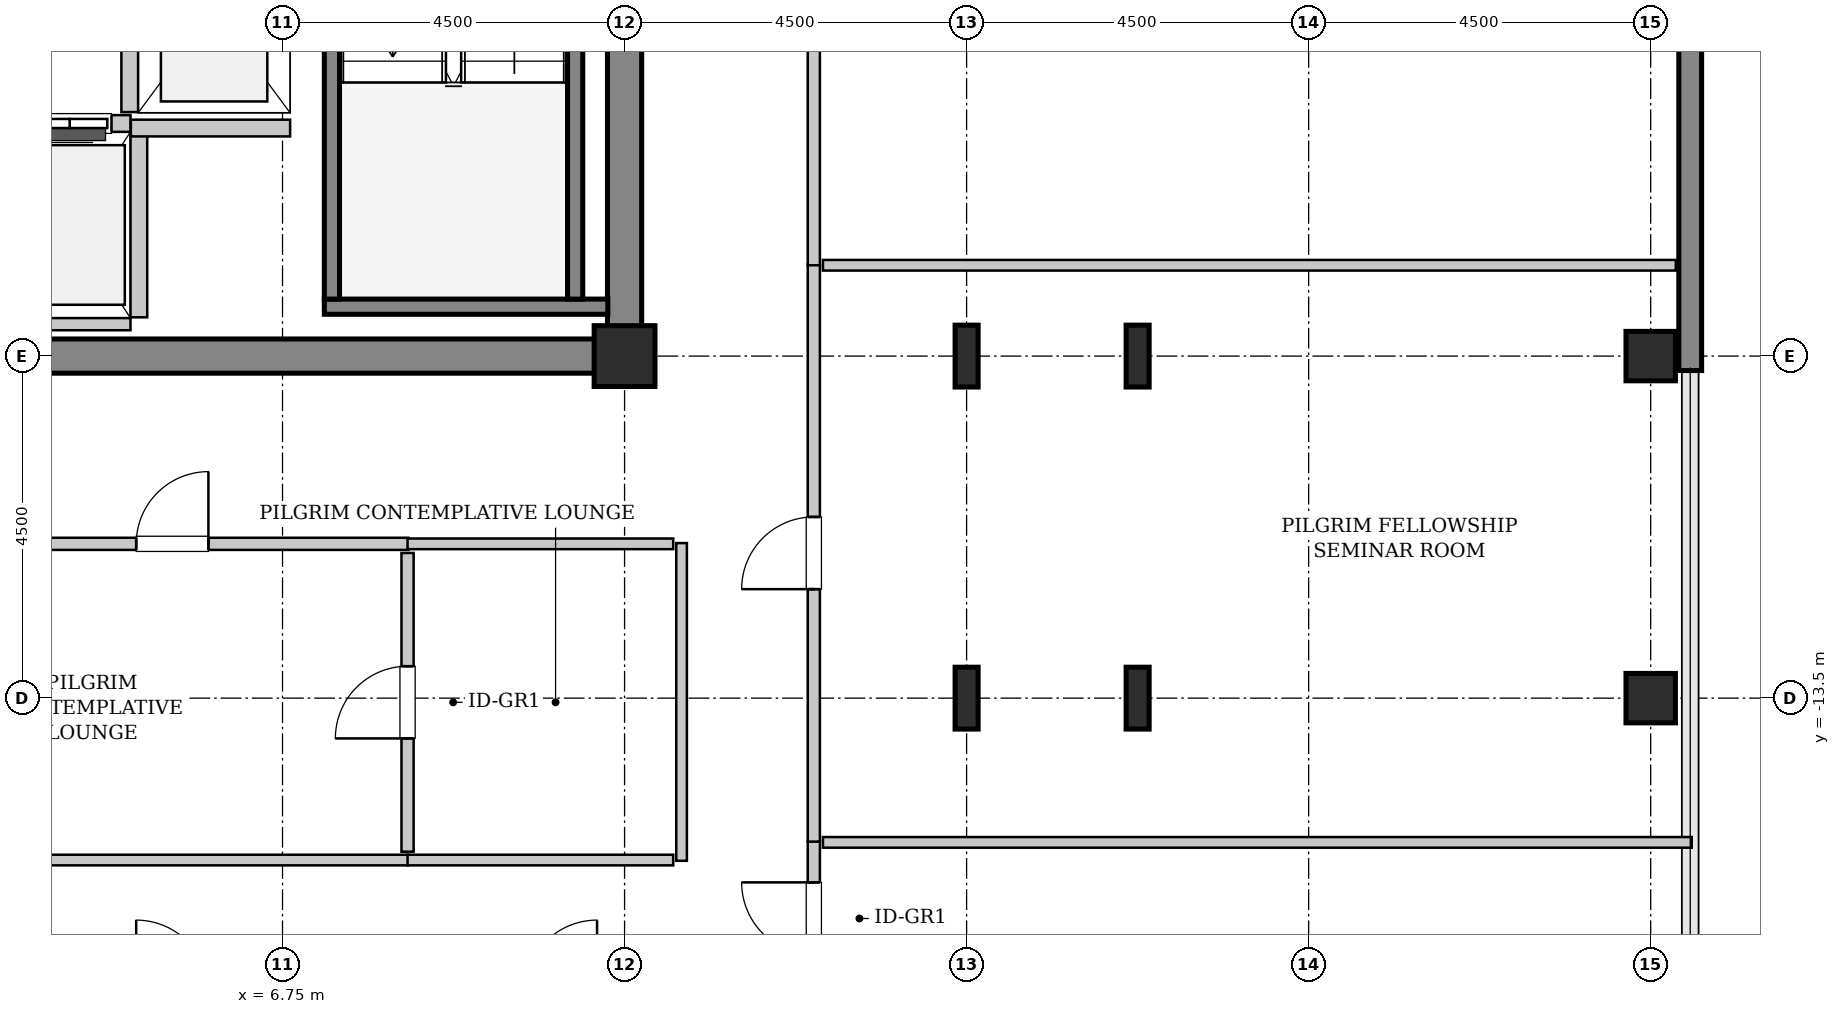
"""IFC4 building model, lengths in metres.
Left out: names, types, materials, properties, quantities, classifications, styles, units other than length and angle.
Written with IfcOpenShell. Run it as: python <this file> out.ifc"""

import sys

from ifc_helpers import new_model, si_unit, direction, frame, frame_2d, origin, origin_2d, place, context, subcontext, project, spatial, rectangle, hollow_rectangle, i_section, extrude, source, transform, mapped, element, fill, save


model = new_model("IFC4")
c1 = context("Model", 3, precision=1e-05, world=origin(), true_north=direction((0.0, 1.0)))
c2 = subcontext(c1, "Body", "Model", "MODEL_VIEW")
j1 = project(units=[si_unit("LENGTHUNIT", "METRE"), si_unit("PLANEANGLEUNIT", "RADIAN")], contexts=[c1])
p1 = place(None, origin())
s1 = spatial("IfcSite", under=j1, at=p1, CompositionType="ELEMENT")
p2 = place(p1, origin())
s2 = spatial("IfcBuilding", under=s1, at=p2, CompositionType="ELEMENT")
p3 = place(p2, frame((0.0, 0.0, 229.4)))
s3 = spatial("IfcBuildingStorey", under=s2, at=p3, CompositionType="ELEMENT", Elevation=229.4)
m1 = source(origin(), c2, "Body", "SweptSolid", [
    extrude(rectangle(XDim=9.925, YDim=0.45, at=frame_2d((4.962, 0.0))), origin(), (0.0, 0.0, 1.0), 3.8),
])
p4 = place(p3, frame((1.55, -9.0, 0.0), z_axis=(0.0, 0.0, 1.0), x_axis=(1.0, 0.0, 0.0)))
e1 = element("IfcWall", 1, at=p4, inside=s3, PredefinedType="SHEAR", context=c2, shape_type="MappedRepresentation", body=[
    mapped(m1, transform((0.0, 0.0, 0.0), x_axis=(1.0, 0.0, 0.0), y_axis=(0.0, 1.0, 0.0), z_axis=(0.0, 0.0, 1.0), scale=1.0)),
])
m2 = source(origin(), c2, "Body", "SweptSolid", [
    extrude(rectangle(XDim=7.425, YDim=0.45, at=frame_2d((3.712, 0.0))), origin(), (0.0, 0.0, 1.0), 3.8),
])
p5 = place(p3, frame((11.25, -8.775, 0.0), z_axis=(0.0, 0.0, 1.0), x_axis=(0.0, 1.0, 0.0)))
e2 = element("IfcWall", 2, at=p5, inside=s3, PredefinedType="SHEAR", context=c2, shape_type="MappedRepresentation", body=[
    mapped(m2, transform((0.0, 0.0, 0.0), x_axis=(1.0, 0.0, 0.0), y_axis=(0.0, 1.0, 0.0), z_axis=(0.0, 0.0, 1.0), scale=1.0)),
])
m3 = source(origin(), c2, "Body", "SweptSolid", [
    extrude(hollow_rectangle(XDim=0.8, YDim=0.8, WallThickness=0.04, InnerFilletRadius=0.04, OuterFilletRadius=0.08, at=origin_2d()), origin(), (0.0, 0.0, 1.0), 3.8),
])
p6 = place(p3, frame((11.25, -9.0, 0.0), z_axis=(0.0, 0.0, 1.0), x_axis=(1.0, 0.0, 0.0)))
e3 = element("IfcColumn", 3, at=p6, inside=s3, PredefinedType="COLUMN", context=c2, shape_type="MappedRepresentation", body=[
    mapped(m3, transform((0.0, 0.0, 0.0), x_axis=(1.0, 0.0, 0.0), y_axis=(0.0, 1.0, 0.0), z_axis=(0.0, 0.0, 1.0), scale=1.0)),
])
m4 = source(origin(), c2, "Body", "SweptSolid", [
    extrude(i_section(OverallWidth=0.303, OverallDepth=0.814, WebThickness=0.021, FlangeThickness=0.04, FilletRadius=0.03, at=origin_2d()), origin(), (0.0, 0.0, 1.0), 3.8),
])
for number, where, z_axis, x_axis in (
    (4, (15.75, -13.5, 0.0), (0.0, 0.0, 1.0), (1.0, 0.0, 0.0)),
    (5, (15.75, -9.0, 0.0), (0.0, 0.0, 1.0), (1.0, 0.0, 0.0)),
    (6, (18.0, -13.5, 0.0), (0.0, 0.0, 1.0), (1.0, 0.0, 0.0)),
    (7, (18.0, -9.0, 0.0), (0.0, 0.0, 1.0), (1.0, 0.0, 0.0)),
):
    element("IfcColumn", number, at=place(p3, frame(where, z_axis=z_axis, x_axis=x_axis)), inside=s3, PredefinedType="COLUMN", context=c2, shape_type="MappedRepresentation", body=[
        mapped(m4, transform((0.0, 0.0, 0.0), x_axis=(1.0, 0.0, 0.0), y_axis=(0.0, 1.0, 0.0), z_axis=(0.0, 0.0, 1.0), scale=1.0)),
    ])
m5 = source(origin(), c2, "Body", "SweptSolid", [
    extrude(hollow_rectangle(XDim=0.65, YDim=0.65, WallThickness=0.032, InnerFilletRadius=0.032, OuterFilletRadius=0.064, at=origin_2d()), origin(), (0.0, 0.0, 1.0), 3.8),
])
for number, where, z_axis, x_axis in (
    (8, (24.75, -13.5, 0.0), (0.0, 0.0, 1.0), (1.0, 0.0, 0.0)),
    (9, (24.75, -9.0, 0.0), (0.0, 0.0, 1.0), (1.0, 0.0, 0.0)),
):
    element("IfcColumn", number, at=place(p3, frame(where, z_axis=z_axis, x_axis=x_axis)), inside=s3, PredefinedType="COLUMN", context=c2, shape_type="MappedRepresentation", body=[
        mapped(m5, transform((0.0, 0.0, 0.0), x_axis=(1.0, 0.0, 0.0), y_axis=(0.0, 1.0, 0.0), z_axis=(0.0, 0.0, 1.0), scale=1.0)),
    ])
m6 = source(origin(), c2, "Body", "SweptSolid", [
    extrude(rectangle(XDim=4.88, YDim=0.3, at=frame_2d((2.44, 0.0))), origin(), (0.0, 0.0, 1.0), 3.55),
])
p7 = place(p3, frame((25.27, -9.19, 0.0), z_axis=(0.0, 0.0, 1.0), x_axis=(0.0, 1.0, 0.0)))
e10 = element("IfcWall", 10, at=p7, inside=s3, PredefinedType="SHEAR", context=c2, shape_type="MappedRepresentation", body=[
    mapped(m6, transform((0.0, 0.0, 0.0), x_axis=(1.0, 0.0, 0.0), y_axis=(0.0, 1.0, 0.0), z_axis=(0.0, 0.0, 1.0), scale=1.0)),
])
m7 = source(origin(), c2, "Body", "SweptSolid", [
    extrude(rectangle(XDim=3.73, YDim=0.2, at=frame_2d((1.865, 0.0))), origin(), (0.0, 0.0, 1.0), 3.8),
])
p8 = place(p3, frame((7.3, -8.35, 0.0), z_axis=(0.0, 0.0, 1.0), x_axis=(1.0, 0.0, 0.0)))
e11 = element("IfcWall", 11, at=p8, inside=s3, PredefinedType="SOLIDWALL", context=c2, shape_type="MappedRepresentation", body=[
    mapped(m7, transform((0.0, 0.0, 0.0), x_axis=(1.0, 0.0, 0.0), y_axis=(0.0, 1.0, 0.0), z_axis=(0.0, 0.0, 1.0), scale=1.0)),
])
m8 = source(origin(), c2, "Body", "SweptSolid", [
    extrude(rectangle(XDim=7.1, YDim=0.2, at=frame_2d((3.55, 0.0))), origin(), (0.0, 0.0, 1.0), 3.8),
])
p9 = place(p3, frame((7.4, -1.15, 0.0), z_axis=(0.0, 0.0, 1.0), x_axis=(0.0, -1.0, 0.0)))
e12 = element("IfcWall", 12, at=p9, inside=s3, PredefinedType="SOLIDWALL", context=c2, shape_type="MappedRepresentation", body=[
    mapped(m8, transform((0.0, 0.0, 0.0), x_axis=(1.0, 0.0, 0.0), y_axis=(0.0, 1.0, 0.0), z_axis=(0.0, 0.0, 1.0), scale=1.0)),
])
p10 = place(p9, frame((0.18, 0.0, 0.0)))
e13 = element("IfcOpeningElement", 13, at=p10, cuts=e12, PredefinedType="OPENING", context=c2, shape_type="SweptSolid", body=[
    extrude(rectangle(XDim=1.1, YDim=2.15, at=frame_2d((0.55, 1.075))), frame((0.0, 0.11, 0.0), z_axis=(0.0, -1.0, 0.0), x_axis=(1.0, 0.0, 0.0)), (0.0, 0.0, 1.0), 0.22),
])
p11 = place(p3, frame((10.6, -1.15, 0.0), z_axis=(0.0, 0.0, 1.0), x_axis=(0.0, -1.0, 0.0)))
e14 = element("IfcWall", 14, at=p11, inside=s3, PredefinedType="SOLIDWALL", context=c2, shape_type="MappedRepresentation", body=[
    mapped(m8, transform((0.0, 0.0, 0.0), x_axis=(1.0, 0.0, 0.0), y_axis=(0.0, 1.0, 0.0), z_axis=(0.0, 0.0, 1.0), scale=1.0)),
])
m9 = source(origin(), c2, "Body", "SweptSolid", [
    extrude(rectangle(XDim=2.68, YDim=0.22, at=frame_2d((1.34, 0.0))), origin(), (0.0, 0.0, 1.0), 3.535),
])
p12 = place(p3, frame((4.74, -3.11, 0.0), z_axis=(0.0, 0.0, 1.0), x_axis=(0.0, -1.0, 0.0)))
e15 = element("IfcWall", 15, at=p12, inside=s3, PredefinedType="SOLIDWALL", context=c2, shape_type="MappedRepresentation", body=[
    mapped(m9, transform((0.0, 0.0, 0.0), x_axis=(1.0, 0.0, 0.0), y_axis=(0.0, 1.0, 0.0), z_axis=(0.0, 0.0, 1.0), scale=1.0)),
])
m10 = source(origin(), c2, "Body", "SweptSolid", [
    extrude(rectangle(XDim=3.2, YDim=0.22, at=frame_2d((1.6, 0.0))), origin(), (0.0, 0.0, 1.0), 3.535),
])
p13 = place(p3, frame((4.75, -5.94, 0.0), z_axis=(0.0, 0.0, 1.0), x_axis=(-1.0, 0.0, 0.0)))
e16 = element("IfcWall", 16, at=p13, inside=s3, PredefinedType="SOLIDWALL", context=c2, shape_type="MappedRepresentation", body=[
    mapped(m10, transform((0.0, 0.0, 0.0), x_axis=(1.0, 0.0, 0.0), y_axis=(0.0, 1.0, 0.0), z_axis=(0.0, 0.0, 1.0), scale=1.0)),
])
p14 = place(p13, frame((1.875, 0.0, 0.0)))
e17 = element("IfcOpeningElement", 17, at=p14, cuts=e16, PredefinedType="OPENING", context=c2, shape_type="SweptSolid", body=[
    extrude(rectangle(XDim=1.1, YDim=2.2, at=frame_2d((0.55, 1.1))), frame((0.0, 0.12, 0.0), z_axis=(0.0, -1.0, 0.0), x_axis=(1.0, 0.0, 0.0)), (0.0, 0.0, 1.0), 0.24),
])
p15 = place(p13, frame((0.25, 0.0, 0.0)))
e18 = element("IfcOpeningElement", 18, at=p15, cuts=e16, PredefinedType="OPENING", context=c2, shape_type="SweptSolid", body=[
    extrude(rectangle(XDim=1.1, YDim=2.2, at=frame_2d((0.55, 1.1))), frame((0.0, 0.12, 0.0), z_axis=(0.0, -1.0, 0.0), x_axis=(1.0, 0.0, 0.0)), (0.0, 0.0, 1.0), 0.24),
])
m11 = source(origin(), c2, "Body", "SweptSolid", [
    extrude(rectangle(XDim=3.2, YDim=0.16, at=frame_2d((1.6, 0.0))), origin(), (0.0, 0.0, 1.0), 2.625),
])
p16 = place(p3, frame((1.55, -8.58, 0.0), z_axis=(0.0, 0.0, 1.0), x_axis=(1.0, 0.0, 0.0)))
e19 = element("IfcWall", 19, at=p16, inside=s3, PredefinedType="PARTITIONING", context=c2, shape_type="MappedRepresentation", body=[
    mapped(m11, transform((0.0, 0.0, 0.0), x_axis=(1.0, 0.0, 0.0), y_axis=(0.0, 1.0, 0.0), z_axis=(0.0, 0.0, 1.0), scale=1.0)),
])
m12 = source(origin(), c2, "Body", "SweptSolid", [
    extrude(rectangle(XDim=2.43, YDim=0.22, at=frame_2d((1.215, 0.0))), origin(), (0.0, 0.0, 1.0), 3.535),
])
p17 = place(p3, frame((4.86, -8.49, 0.0), z_axis=(0.0, 0.0, 1.0), x_axis=(0.0, 1.0, 0.0)))
e20 = element("IfcWall", 20, at=p17, inside=s3, PredefinedType="SOLIDWALL", context=c2, shape_type="MappedRepresentation", body=[
    mapped(m12, transform((0.0, 0.0, 0.0), x_axis=(1.0, 0.0, 0.0), y_axis=(0.0, 1.0, 0.0), z_axis=(0.0, 0.0, 1.0), scale=1.0)),
])
m13 = source(origin(), c2, "Body", "SweptSolid", [
    extrude(rectangle(XDim=2.095, YDim=0.22, at=frame_2d((1.048, 0.0))), origin(), (0.0, 0.0, 1.0), 3.535),
])
p18 = place(p3, frame((4.755, -6.0, 0.0), z_axis=(0.0, 0.0, 1.0), x_axis=(1.0, 0.0, 0.0)))
e21 = element("IfcWall", 21, at=p18, inside=s3, PredefinedType="SOLIDWALL", context=c2, shape_type="MappedRepresentation", body=[
    mapped(m13, transform((0.0, 0.0, 0.0), x_axis=(1.0, 0.0, 0.0), y_axis=(0.0, 1.0, 0.0), z_axis=(0.0, 0.0, 1.0), scale=1.0)),
])
m14 = source(origin(), c2, "Body", "SweptSolid", [
    extrude(rectangle(XDim=7.653, YDim=0.16, at=frame_2d((3.826, 0.0))), origin(), (0.0, 0.0, 1.0), 3.535),
])
p19 = place(p3, frame((13.74, -23.04, 0.0), z_axis=(0.0, 0.0, 1.0), x_axis=(0.0, 1.0, 0.0)))
e22 = element("IfcWall", 22, at=p19, inside=s3, PredefinedType="PARTITIONING", context=c2, shape_type="MappedRepresentation", body=[
    mapped(m14, transform((0.0, 0.0, 0.0), x_axis=(1.0, 0.0, 0.0), y_axis=(0.0, 1.0, 0.0), z_axis=(0.0, 0.0, 1.0), scale=1.0)),
])
p20 = place(p19, frame((6.166, 0.0, 0.0)))
e23 = element("IfcOpeningElement", 23, at=p20, cuts=e22, PredefinedType="OPENING", context=c2, shape_type="SweptSolid", body=[
    extrude(rectangle(XDim=0.95, YDim=2.1, at=frame_2d((0.475, 1.05))), frame((0.0, 0.09, 0.0), z_axis=(0.0, -1.0, 0.0), x_axis=(1.0, 0.0, 0.0)), (0.0, 0.0, 1.0), 0.18),
])
m15 = source(origin(), c2, "Body", "SweptSolid", [
    extrude(rectangle(XDim=11.43, YDim=0.14, at=frame_2d((5.715, 0.0))), origin(), (0.0, 0.0, 1.0), 3.535),
])
p21 = place(p3, frame((13.86, -15.397, 0.0), z_axis=(0.0, 0.0, 1.0), x_axis=(1.0, 0.0, 0.0)))
e24 = element("IfcWall", 24, at=p21, inside=s3, PredefinedType="PARTITIONING", context=c2, shape_type="MappedRepresentation", body=[
    mapped(m15, transform((0.0, 0.0, 0.0), x_axis=(1.0, 0.0, 0.0), y_axis=(0.0, 1.0, 0.0), z_axis=(0.0, 0.0, 1.0), scale=1.0)),
])
m16 = source(origin(), c2, "Body", "SweptSolid", [
    extrude(rectangle(XDim=7.593, YDim=0.16, at=frame_2d((3.796, 0.0))), origin(), (0.0, 0.0, 1.0), 3.535),
])
p22 = place(p3, frame((13.74, -15.387, 0.0), z_axis=(0.0, 0.0, 1.0), x_axis=(0.0, 1.0, 0.0)))
e25 = element("IfcWall", 25, at=p22, inside=s3, PredefinedType="PARTITIONING", context=c2, shape_type="MappedRepresentation", body=[
    mapped(m16, transform((0.0, 0.0, 0.0), x_axis=(1.0, 0.0, 0.0), y_axis=(0.0, 1.0, 0.0), z_axis=(0.0, 0.0, 1.0), scale=1.0)),
])
p23 = place(p22, frame((3.321, 0.0, 0.0)))
e26 = element("IfcOpeningElement", 26, at=p23, cuts=e25, PredefinedType="OPENING", context=c2, shape_type="SweptSolid", body=[
    extrude(rectangle(XDim=0.95, YDim=2.1, at=frame_2d((0.475, 1.05))), frame((0.0, 0.09, 0.0), z_axis=(0.0, -1.0, 0.0), x_axis=(1.0, 0.0, 0.0)), (0.0, 0.0, 1.0), 0.18),
])
m17 = source(origin(), c2, "Body", "SweptSolid", [
    extrude(rectangle(XDim=11.22, YDim=0.14, at=frame_2d((5.61, 0.0))), origin(), (0.0, 0.0, 1.0), 3.535),
])
p24 = place(p3, frame((13.86, -7.805, 0.0), z_axis=(0.0, 0.0, 1.0), x_axis=(1.0, 0.0, 0.0)))
e27 = element("IfcWall", 27, at=p24, inside=s3, PredefinedType="PARTITIONING", context=c2, shape_type="MappedRepresentation", body=[
    mapped(m17, transform((0.0, 0.0, 0.0), x_axis=(1.0, 0.0, 0.0), y_axis=(0.0, 1.0, 0.0), z_axis=(0.0, 0.0, 1.0), scale=1.0)),
])
m18 = source(origin(), c2, "Body", "SweptSolid", [
    extrude(rectangle(XDim=7.61, YDim=0.16, at=frame_2d((3.805, 0.0))), origin(), (0.0, 0.0, 1.0), 3.535),
])
p25 = place(p3, frame((13.74, -7.805, 0.0), z_axis=(0.0, 0.0, 1.0), x_axis=(0.0, 1.0, 0.0)))
e28 = element("IfcWall", 28, at=p25, inside=s3, PredefinedType="PARTITIONING", context=c2, shape_type="MappedRepresentation", body=[
    mapped(m18, transform((0.0, 0.0, 0.0), x_axis=(1.0, 0.0, 0.0), y_axis=(0.0, 1.0, 0.0), z_axis=(0.0, 0.0, 1.0), scale=1.0)),
])
p26 = place(p25, frame((3.33, 0.0, 0.0)))
e29 = element("IfcOpeningElement", 29, at=p26, cuts=e28, PredefinedType="OPENING", context=c2, shape_type="SweptSolid", body=[
    extrude(rectangle(XDim=0.95, YDim=2.1, at=frame_2d((0.475, 1.05))), frame((0.0, 0.09, 0.0), z_axis=(0.0, -1.0, 0.0), x_axis=(1.0, 0.0, 0.0)), (0.0, 0.0, 1.0), 0.18),
])
m19 = source(origin(), c2, "Body", "SweptSolid", [
    extrude(rectangle(XDim=6.21, YDim=0.16, at=frame_2d((3.105, 0.0))), origin(), (0.0, 0.0, 1.0), 3.535),
])
p27 = place(p3, frame((2.195, -11.47, 0.0), z_axis=(0.0, 0.0, 1.0), x_axis=(1.0, 0.0, 0.0)))
e30 = element("IfcWall", 30, at=p27, inside=s3, PredefinedType="PARTITIONING", context=c2, shape_type="MappedRepresentation", body=[
    mapped(m19, transform((0.0, 0.0, 0.0), x_axis=(1.0, 0.0, 0.0), y_axis=(0.0, 1.0, 0.0), z_axis=(0.0, 0.0, 1.0), scale=1.0)),
])
p28 = place(p27, frame((2.63, 0.0, 0.0)))
e31 = element("IfcOpeningElement", 31, at=p28, cuts=e30, PredefinedType="OPENING", context=c2, shape_type="SweptSolid", body=[
    extrude(rectangle(XDim=0.95, YDim=2.1, at=frame_2d((0.475, 1.05))), frame((0.0, 0.09, 0.0), z_axis=(0.0, -1.0, 0.0), x_axis=(1.0, 0.0, 0.0)), (0.0, 0.0, 1.0), 0.18),
])
m20 = source(origin(), c2, "Body", "SweptSolid", [
    extrude(rectangle(XDim=6.21, YDim=0.14, at=frame_2d((3.105, 0.0))), origin(), (0.0, 0.0, 1.0), 3.535),
])
p29 = place(p3, frame((2.195, -15.63, 0.0), z_axis=(0.0, 0.0, 1.0), x_axis=(1.0, 0.0, 0.0)))
e32 = element("IfcWall", 32, at=p29, inside=s3, PredefinedType="PARTITIONING", context=c2, shape_type="MappedRepresentation", body=[
    mapped(m20, transform((0.0, 0.0, 0.0), x_axis=(1.0, 0.0, 0.0), y_axis=(0.0, 1.0, 0.0), z_axis=(0.0, 0.0, 1.0), scale=1.0)),
])
m21 = source(origin(), c2, "Body", "SweptSolid", [
    extrude(rectangle(XDim=3.93, YDim=0.16, at=frame_2d((1.965, 0.0))), origin(), (0.0, 0.0, 1.0), 3.535),
])
p30 = place(p3, frame((8.395, -15.52, 0.0), z_axis=(0.0, 0.0, 1.0), x_axis=(0.0, 1.0, 0.0)))
e33 = element("IfcWall", 33, at=p30, inside=s3, PredefinedType="PARTITIONING", context=c2, shape_type="MappedRepresentation", body=[
    mapped(m21, transform((0.0, 0.0, 0.0), x_axis=(1.0, 0.0, 0.0), y_axis=(0.0, 1.0, 0.0), z_axis=(0.0, 0.0, 1.0), scale=1.0)),
])
p31 = place(p30, frame((1.49, 0.0, 0.0)))
e34 = element("IfcOpeningElement", 34, at=p31, cuts=e33, PredefinedType="OPENING", context=c2, shape_type="SweptSolid", body=[
    extrude(rectangle(XDim=0.95, YDim=2.1, at=frame_2d((0.475, 1.05))), frame((0.0, 0.09, 0.0), z_axis=(0.0, -1.0, 0.0), x_axis=(1.0, 0.0, 0.0)), (0.0, 0.0, 1.0), 0.18),
])
m22 = source(origin(), c2, "Body", "SweptSolid", [
    extrude(rectangle(XDim=4.18, YDim=0.14, at=frame_2d((2.09, 0.0))), origin(), (0.0, 0.0, 1.0), 3.535),
])
p32 = place(p3, frame((12.0, -15.64, 0.0), z_axis=(0.0, 0.0, 1.0), x_axis=(0.0, 1.0, 0.0)))
e35 = element("IfcWall", 35, at=p32, inside=s3, PredefinedType="PARTITIONING", context=c2, shape_type="MappedRepresentation", body=[
    mapped(m22, transform((0.0, 0.0, 0.0), x_axis=(1.0, 0.0, 0.0), y_axis=(0.0, 1.0, 0.0), z_axis=(0.0, 0.0, 1.0), scale=1.0)),
])
m23 = source(origin(), c2, "Body", "SweptSolid", [
    extrude(rectangle(XDim=3.495, YDim=0.14, at=frame_2d((1.748, 0.0))), origin(), (0.0, 0.0, 1.0), 3.535),
])
for number, where, z_axis, x_axis in (
    (36, (8.395, -11.47, 0.0), (0.0, 0.0, 1.0), (1.0, 0.0, 0.0)),
    (37, (8.395, -15.63, 0.0), (0.0, 0.0, 1.0), (1.0, 0.0, 0.0)),
):
    element("IfcWall", number, at=place(p3, frame(where, z_axis=z_axis, x_axis=x_axis)), inside=s3, PredefinedType="PARTITIONING", context=c2, shape_type="MappedRepresentation", body=[
        mapped(m23, transform((0.0, 0.0, 0.0), x_axis=(1.0, 0.0, 0.0), y_axis=(0.0, 1.0, 0.0), z_axis=(0.0, 0.0, 1.0), scale=1.0)),
    ])
m24 = source(origin(), c2, "Body", "SweptSolid", [
    extrude(rectangle(XDim=1.1, YDim=2.2, at=frame_2d((0.55, 1.1))), frame((0.0, 0.025, 0.0), z_axis=(0.0, -1.0, 0.0), x_axis=(1.0, 0.0, 0.0)), (0.0, 0.0, 1.0), 0.05),
])
p33 = place(p15, origin())
e38 = element("IfcDoor", 38, at=p33, inside=s3, OperationType="DOUBLE_DOOR_SLIDING", PredefinedType="DOOR", context=c2, shape_type="MappedRepresentation", body=[
    mapped(m24, transform((0.0, 0.0, 0.0), x_axis=(1.0, 0.0, 0.0), y_axis=(0.0, 1.0, 0.0), z_axis=(0.0, 0.0, 1.0), scale=1.0)),
])
fill(e18, e38)
m25 = source(origin(), c2, "Body", "SweptSolid", [
    extrude(rectangle(XDim=0.95, YDim=2.1, at=frame_2d((0.475, 1.05))), frame((0.0, 0.025, 0.0), z_axis=(0.0, -1.0, 0.0), x_axis=(1.0, 0.0, 0.0)), (0.0, 0.0, 1.0), 0.05),
])
p34 = place(p20, origin())
e39 = element("IfcDoor", 39, at=p34, inside=s3, OperationType="SINGLE_SWING_RIGHT", PredefinedType="DOOR", context=c2, shape_type="MappedRepresentation", body=[
    mapped(m25, transform((0.0, 0.0, 0.0), x_axis=(1.0, 0.0, 0.0), y_axis=(0.0, 1.0, 0.0), z_axis=(0.0, 0.0, 1.0), scale=1.0)),
])
fill(e23, e39)
p35 = place(p23, origin())
e40 = element("IfcDoor", 40, at=p35, inside=s3, OperationType="SINGLE_SWING_LEFT", PredefinedType="DOOR", context=c2, shape_type="MappedRepresentation", body=[
    mapped(m25, transform((0.0, 0.0, 0.0), x_axis=(1.0, 0.0, 0.0), y_axis=(0.0, 1.0, 0.0), z_axis=(0.0, 0.0, 1.0), scale=1.0)),
])
fill(e26, e40)
p36 = place(p28, origin())
e41 = element("IfcDoor", 41, at=p36, inside=s3, OperationType="SINGLE_SWING_RIGHT", PredefinedType="DOOR", context=c2, shape_type="MappedRepresentation", body=[
    mapped(m25, transform((0.0, 0.0, 0.0), x_axis=(1.0, 0.0, 0.0), y_axis=(0.0, 1.0, 0.0), z_axis=(0.0, 0.0, 1.0), scale=1.0)),
])
fill(e31, e41)
p37 = place(p31, origin())
e42 = element("IfcDoor", 42, at=p37, inside=s3, OperationType="SINGLE_SWING_LEFT", PredefinedType="DOOR", context=c2, shape_type="MappedRepresentation", body=[
    mapped(m25, transform((0.0, 0.0, 0.0), x_axis=(1.0, 0.0, 0.0), y_axis=(0.0, 1.0, 0.0), z_axis=(0.0, 0.0, 1.0), scale=1.0)),
])
fill(e34, e42)
save(model, sys.argv[1])
